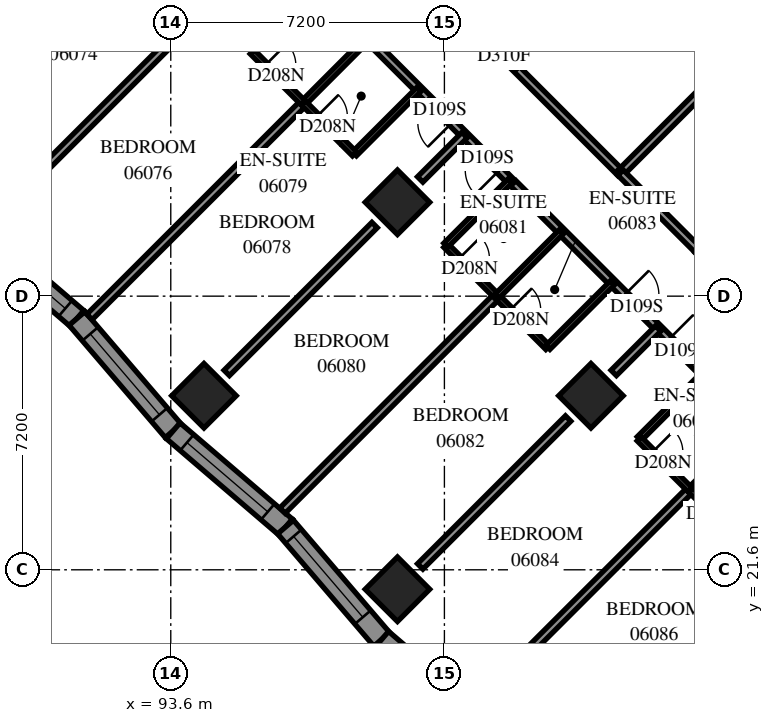
"""IFC4 building model, lengths in metres.
Left out: names, types, materials, properties, quantities, classifications, styles, units other than length and angle.
Written with IfcOpenShell. Run it as: python <this file> out.ifc"""

import sys

from ifc_helpers import new_model, si_unit, direction, frame, frame_2d, origin, origin_2d, place, context, subcontext, project, spatial, polyline, rectangle, outline, extrude, element, fill, save


model = new_model("IFC4")
c1 = context("Model", 3, precision=1e-05, world=origin(), true_north=direction((0.0, 1.0)))
c2 = subcontext(c1, "Body", "Model", "MODEL_VIEW")
j1 = project(units=[si_unit("LENGTHUNIT", "METRE"), si_unit("PLANEANGLEUNIT", "RADIAN")], contexts=[c1])
p1 = place(None, origin())
s1 = spatial("IfcSite", under=j1, at=p1, CompositionType="ELEMENT")
p2 = place(p1, origin())
s2 = spatial("IfcBuilding", under=s1, at=p2, CompositionType="ELEMENT")
p3 = place(p2, frame((0.0, 0.0, 27.0)))
s3 = spatial("IfcBuildingStorey", under=s2, at=p3, CompositionType="ELEMENT", Elevation=27.0)
for number, where, z_axis, x_axis in (
    (1, (99.565, 31.271, 0.0), (0.0, 0.0, 1.0), (0.707, -0.707, 0.0)),
    (2, (94.474, 26.18, 0.0), (0.0, 0.0, 1.0), (0.707, -0.707, 0.0)),
    (3, (104.656, 26.18, 0.0), (0.0, 0.0, 1.0), (0.707, -0.707, 0.0)),
    (4, (99.565, 21.088, 0.0), (0.0, 0.0, 1.0), (0.707, -0.707, 0.0)),
):
    element("IfcColumn", number, at=place(p3, frame(where, z_axis=z_axis, x_axis=x_axis)), inside=s3, PredefinedType="COLUMN", context=c2, shape_type="SweptSolid", body=[
        extrude(rectangle(XDim=1.2, YDim=1.2, at=origin_2d()), origin(), (0.0, 0.0, 1.0), 3.1),
    ])
p4 = place(p3, frame((88.177, 30.745, 0.0), z_axis=(0.0, 0.0, 1.0), x_axis=(0.7595159183, -0.6504887161, 0.0)))
e5 = element("IfcWall", 5, at=p4, inside=s3, PredefinedType="SOLIDWALL", context=c2, shape_type="SweptSolid", body=[
    extrude(outline(polyline([(-0.021, -0.275), (3.87, -0.275), (3.913, 0.275), (0.021, 0.275), (-0.021, -0.275)])), origin(), (0.0, 0.0, 1.0), 3.1),
])
p5 = place(p4, frame((0.687, 0.0, 0.5)))
e6 = element("IfcOpeningElement", 6, at=p5, cuts=e5, PredefinedType="OPENING", context=c2, shape_type="SweptSolid", body=[
    extrude(rectangle(XDim=2.8, YDim=2.45, at=frame_2d((1.4, 1.225))), frame((0.0, 0.285, 0.0), z_axis=(0.0, -1.0, 0.0), x_axis=(1.0, 0.0, 0.0)), (0.0, 0.0, 1.0), 0.57),
])
p6 = place(p3, frame((91.133, 28.213, 0.0), z_axis=(0.0, 0.0, 1.0), x_axis=(0.6504887161, -0.7595159183, 0.0)))
e7 = element("IfcWall", 7, at=p6, inside=s3, PredefinedType="SOLIDWALL", context=c2, shape_type="SweptSolid", body=[
    extrude(outline(polyline([(0.021, -0.275), (3.913, -0.275), (3.87, 0.275), (-0.021, 0.275), (0.021, -0.275)])), origin(), (0.0, 0.0, 1.0), 3.1),
])
p7 = place(p6, frame((0.535, 0.0, 0.5)))
e8 = element("IfcOpeningElement", 8, at=p7, cuts=e7, PredefinedType="OPENING", context=c2, shape_type="SweptSolid", body=[
    extrude(rectangle(XDim=2.8, YDim=2.45, at=frame_2d((1.4, 1.225))), frame((0.0, 0.285, 0.0), z_axis=(0.0, -1.0, 0.0), x_axis=(1.0, 0.0, 0.0)), (0.0, 0.0, 1.0), 0.57),
])
p8 = place(p3, frame((93.664, 25.258, 0.0), z_axis=(0.0, 0.0, 1.0), x_axis=(0.7595050452, -0.6505014115, 0.0)))
e9 = element("IfcWall", 9, at=p8, inside=s3, PredefinedType="SOLIDWALL", context=c2, shape_type="SweptSolid", body=[
    extrude(outline(polyline([(-0.021, -0.275), (3.87, -0.275), (3.913, 0.275), (0.021, 0.275), (-0.021, -0.275)])), origin(), (0.0, 0.0, 1.0), 3.1),
])
p9 = place(p8, frame((0.476, 0.0, 0.5)))
e10 = element("IfcOpeningElement", 10, at=p9, cuts=e9, PredefinedType="OPENING", context=c2, shape_type="SweptSolid", body=[
    extrude(rectangle(XDim=2.8, YDim=2.45, at=frame_2d((1.4, 1.225))), frame((0.0, 0.285, 0.0), z_axis=(0.0, -1.0, 0.0), x_axis=(1.0, 0.0, 0.0)), (0.0, 0.0, 1.0), 0.57),
])
p10 = place(p3, frame((96.62, 22.726, 0.0), z_axis=(0.0, 0.0, 1.0), x_axis=(0.6505014115, -0.7595050452, 0.0)))
e11 = element("IfcWall", 11, at=p10, inside=s3, PredefinedType="SOLIDWALL", context=c2, shape_type="SweptSolid", body=[
    extrude(outline(polyline([(0.021, -0.275), (3.913, -0.275), (3.87, 0.275), (-0.021, 0.275), (0.021, -0.275)])), origin(), (0.0, 0.0, 1.0), 3.1),
])
p11 = place(p10, frame((0.325, 0.0, 0.5)))
e12 = element("IfcOpeningElement", 12, at=p11, cuts=e11, PredefinedType="OPENING", context=c2, shape_type="SweptSolid", body=[
    extrude(rectangle(XDim=2.8, YDim=2.45, at=frame_2d((1.4, 1.225))), frame((0.0, 0.285, 0.0), z_axis=(0.0, -1.0, 0.0), x_axis=(1.0, 0.0, 0.0)), (0.0, 0.0, 1.0), 0.57),
])
p12 = place(p3, frame((99.151, 19.77, 0.0), z_axis=(0.0, 0.0, 1.0), x_axis=(0.7595163258, -0.6504882403, 0.0)))
e13 = element("IfcWall", 13, at=p12, inside=s3, PredefinedType="SOLIDWALL", context=c2, shape_type="SweptSolid", body=[
    extrude(outline(polyline([(-0.021, -0.275), (3.87, -0.275), (3.955, 0.275), (0.021, 0.275), (-0.021, -0.275)])), origin(), (0.0, 0.0, 1.0), 3.1),
])
p13 = place(p12, frame((0.995, 0.0, 0.5)))
e14 = element("IfcOpeningElement", 14, at=p13, cuts=e13, PredefinedType="OPENING", context=c2, shape_type="SweptSolid", body=[
    extrude(rectangle(XDim=1.2, YDim=2.45, at=frame_2d((0.6, 1.225))), frame((0.0, 0.285, 0.0), z_axis=(0.0, -1.0, 0.0), x_axis=(1.0, 0.0, 0.0)), (0.0, 0.0, 1.0), 0.57),
])
p14 = place(p3, frame((94.895, 42.581, 0.0), z_axis=(0.0, 0.0, 1.0), x_axis=(0.7071067812, -0.7071067812, 0.0)))
e15 = element("IfcWall", 15, at=p14, inside=s3, PredefinedType="PARTITIONING", context=c2, shape_type="SweptSolid", body=[
    extrude(rectangle(XDim=14.9, YDim=0.2, at=frame_2d((7.45, 0.0))), origin(), (0.0, 0.0, 1.0), 3.1),
])
p15 = place(p14, frame((2.8, 0.0, 0.0)))
e16 = element("IfcOpeningElement", 16, at=p15, cuts=e15, PredefinedType="OPENING", context=c2, shape_type="SweptSolid", body=[
    extrude(rectangle(XDim=0.9, YDim=2.1, at=frame_2d((0.45, 1.05))), frame((0.0, 0.11, 0.0), z_axis=(0.0, -1.0, 0.0), x_axis=(1.0, 0.0, 0.0)), (0.0, 0.0, 1.0), 0.22),
])
p16 = place(p14, frame((4.348, 0.0, 0.0)))
e17 = element("IfcOpeningElement", 17, at=p16, cuts=e15, PredefinedType="OPENING", context=c2, shape_type="SweptSolid", body=[
    extrude(rectangle(XDim=0.9, YDim=2.1, at=frame_2d((0.45, 1.05))), frame((0.0, 0.11, 0.0), z_axis=(0.0, -1.0, 0.0), x_axis=(1.0, 0.0, 0.0)), (0.0, 0.0, 1.0), 0.22),
])
p17 = place(p14, frame((10.073, 0.0, 0.0)))
e18 = element("IfcOpeningElement", 18, at=p17, cuts=e15, PredefinedType="OPENING", context=c2, shape_type="SweptSolid", body=[
    extrude(rectangle(XDim=1.0, YDim=2.1, at=frame_2d((0.5, 1.05))), frame((0.0, 0.11, 0.0), z_axis=(0.0, -1.0, 0.0), x_axis=(1.0, 0.0, 0.0)), (0.0, 0.0, 1.0), 0.22),
])
p18 = place(p3, frame((102.609, 31.769, 0.0), z_axis=(0.0, 0.0, 1.0), x_axis=(0.7071067812, -0.7071067812, 0.0)))
e19 = element("IfcWall", 19, at=p18, inside=s3, PredefinedType="PARTITIONING", context=c2, shape_type="SweptSolid", body=[
    extrude(rectangle(XDim=10.723, YDim=0.2, at=frame_2d((5.361, 0.0))), origin(), (0.0, 0.0, 1.0), 3.1),
])
p19 = place(p18, frame((4.15, 0.0, 0.0)))
e20 = element("IfcOpeningElement", 20, at=p19, cuts=e19, PredefinedType="OPENING", context=c2, shape_type="SweptSolid", body=[
    extrude(rectangle(XDim=0.9, YDim=2.1, at=frame_2d((0.45, 1.05))), frame((0.0, 0.11, 0.0), z_axis=(0.0, -1.0, 0.0), x_axis=(1.0, 0.0, 0.0)), (0.0, 0.0, 1.0), 0.22),
])
p20 = place(p18, frame((5.8, 0.0, 0.0)))
e21 = element("IfcOpeningElement", 21, at=p20, cuts=e19, PredefinedType="OPENING", context=c2, shape_type="SweptSolid", body=[
    extrude(rectangle(XDim=0.9, YDim=2.1, at=frame_2d((0.45, 1.05))), frame((0.0, 0.11, 0.0), z_axis=(0.0, -1.0, 0.0), x_axis=(1.0, 0.0, 0.0)), (0.0, 0.0, 1.0), 0.22),
])
p21 = place(p3, frame((105.437, 32.045, 0.0), z_axis=(0.0, 0.0, 1.0), x_axis=(0.7070125995, 0.7072009503, 0.0)))
e22 = element("IfcWall", 22, at=p21, inside=s3, PredefinedType="PARTITIONING", context=c2, shape_type="SweptSolid", body=[
    extrude(rectangle(XDim=10.618, YDim=0.2, at=frame_2d((5.309, 0.0))), origin(), (0.0, 0.0, 1.0), 3.1),
])
p22 = place(p3, frame((86.838, 34.522, 0.0), z_axis=(0.0, 0.0, 1.0), x_axis=(0.7072154749, 0.7069980708, 0.0)))
e23 = element("IfcWall", 23, at=p22, inside=s3, PredefinedType="PARTITIONING", context=c2, shape_type="SweptSolid", body=[
    extrude(rectangle(XDim=9.2, YDim=0.2, at=frame_2d((4.6, 0.0))), origin(), (0.0, 0.0, 1.0), 3.1),
])
p23 = place(p3, frame((101.597, 18.038, 0.0), z_axis=(0.0, 0.0, 1.0), x_axis=(0.7072439346, 0.7069696012, 0.0)))
e24 = element("IfcWall", 24, at=p23, inside=s3, PredefinedType="PARTITIONING", context=c2, shape_type="SweptSolid", body=[
    extrude(rectangle(XDim=8.019, YDim=0.2, at=frame_2d((4.01, 0.0))), origin(), (0.0, 0.0, 1.0), 3.1),
])
p24 = place(p3, frame((86.339, 33.313, 0.0), z_axis=(0.0, 0.0, 1.0), x_axis=(0.7069756325, 0.7072379055, 0.0)))
e25 = element("IfcWall", 25, at=p24, inside=s3, PredefinedType="PARTITIONING", context=c2, shape_type="SweptSolid", body=[
    extrude(rectangle(XDim=8.007, YDim=0.2, at=frame_2d((4.003, 0.0))), origin(), (0.0, 0.0, 1.0), 3.1),
])
p25 = place(p3, frame((96.54, 23.157, 0.0), z_axis=(0.0, 0.0, 1.0), x_axis=(0.7071067812, 0.7071067812, 0.0)))
e26 = element("IfcWall", 26, at=p25, inside=s3, PredefinedType="PARTITIONING", context=c2, shape_type="SweptSolid", body=[
    extrude(rectangle(XDim=7.977, YDim=0.2, at=frame_2d((3.989, 0.0))), origin(), (0.0, 0.0, 1.0), 3.1),
])
p26 = place(p3, frame((91.461, 28.253, 0.0), z_axis=(0.0, 0.0, 1.0), x_axis=(0.707238618, 0.7069749198, 0.0)))
e27 = element("IfcWall", 27, at=p26, inside=s3, PredefinedType="PARTITIONING", context=c2, shape_type="SweptSolid", body=[
    extrude(rectangle(XDim=7.964, YDim=0.2, at=frame_2d((3.982, 0.0))), origin(), (0.0, 0.0, 1.0), 3.1),
])
p27 = place(p3, frame((102.531, 31.833, 0.0), z_axis=(0.0, 0.0, 1.0), x_axis=(-0.7070095491, 0.7072039999, 0.0)))
e28 = element("IfcWall", 28, at=p27, inside=s3, PredefinedType="PARTITIONING", context=c2, shape_type="SweptSolid", body=[
    extrude(rectangle(XDim=7.2, YDim=0.2, at=frame_2d((3.6, 0.0))), origin(), (0.0, 0.0, 1.0), 3.1),
])
p28 = place(p27, frame((2.165, 0.0, 0.0)))
e29 = element("IfcOpeningElement", 29, at=p28, cuts=e28, PredefinedType="OPENING", context=c2, shape_type="SweptSolid", body=[
    extrude(rectangle(XDim=0.9, YDim=2.1, at=frame_2d((0.45, 1.05))), frame((0.0, 0.11, 0.0), z_axis=(0.0, -1.0, 0.0), x_axis=(1.0, 0.0, 0.0)), (0.0, 0.0, 1.0), 0.22),
])
p29 = place(p27, frame((0.4, 0.0, 0.0)))
e30 = element("IfcOpeningElement", 30, at=p29, cuts=e28, PredefinedType="OPENING", context=c2, shape_type="SweptSolid", body=[
    extrude(rectangle(XDim=0.9, YDim=2.1, at=frame_2d((0.45, 1.05))), frame((0.0, 0.11, 0.0), z_axis=(0.0, -1.0, 0.0), x_axis=(1.0, 0.0, 0.0)), (0.0, 0.0, 1.0), 0.22),
])
p30 = place(p3, frame((105.255, 16.599, 0.0), z_axis=(0.0, 0.0, 1.0), x_axis=(0.7071067812, 0.7071067812, 0.0)))
e31 = element("IfcWall", 31, at=p30, inside=s3, PredefinedType="PARTITIONING", context=c2, shape_type="SweptSolid", body=[
    extrude(rectangle(XDim=5.504, YDim=0.2, at=frame_2d((2.752, 0.0))), origin(), (0.0, 0.0, 1.0), 2.6),
])
for number, where, z_axis, x_axis in (
    (32, (89.981, 31.871, 0.0), (0.0, 0.0, 1.0), (0.707, 0.707, 0.0)),
    (33, (100.163, 21.689, 0.0), (0.0, 0.0, 1.0), (0.707, 0.707, 0.0)),
):
    element("IfcWall", number, at=place(p3, frame(where, z_axis=z_axis, x_axis=x_axis)), inside=s3, PredefinedType="PARTITIONING", context=c2, shape_type="SweptSolid", body=[
        extrude(rectangle(XDim=5.504, YDim=0.2, at=frame_2d((2.752, 0.0))), origin(), (0.0, 0.0, 1.0), 3.1),
    ])
p31 = place(p3, frame((95.073, 26.781, 0.0), z_axis=(0.0, 0.0, 1.0), x_axis=(0.7071067812, 0.7071067812, 0.0)))
e34 = element("IfcWall", 34, at=p31, inside=s3, PredefinedType="PARTITIONING", context=c2, shape_type="SweptSolid", body=[
    extrude(rectangle(XDim=5.501, YDim=0.2, at=frame_2d((2.751, 0.0))), origin(), (0.0, 0.0, 1.0), 3.1),
])
p32 = place(p3, frame((100.836, 30.138, 0.0), z_axis=(0.0, 0.0, 1.0), x_axis=(0.7065802685, -0.7076329021, 0.0)))
e35 = element("IfcWall", 35, at=p32, inside=s3, PredefinedType="PARTITIONING", context=c2, shape_type="SweptSolid", body=[
    extrude(rectangle(XDim=3.8, YDim=0.15, at=frame_2d((1.9, 0.0))), origin(), (0.0, 0.0, 1.0), 3.1),
])
p33 = place(p32, frame((0.493, 0.0, 0.0)))
e36 = element("IfcOpeningElement", 36, at=p33, cuts=e35, PredefinedType="OPENING", context=c2, shape_type="SweptSolid", body=[
    extrude(rectangle(XDim=0.8, YDim=2.1, at=frame_2d((0.4, 1.05))), frame((0.0, 0.085, 0.0), z_axis=(0.0, -1.0, 0.0), x_axis=(1.0, 0.0, 0.0)), (0.0, 0.0, 1.0), 0.17),
])
p34 = place(p32, frame((2.402, 0.0, 0.0)))
e37 = element("IfcOpeningElement", 37, at=p34, cuts=e35, PredefinedType="OPENING", context=c2, shape_type="SweptSolid", body=[
    extrude(rectangle(XDim=0.8, YDim=2.1, at=frame_2d((0.4, 1.05))), frame((0.0, 0.085, 0.0), z_axis=(0.0, -1.0, 0.0), x_axis=(1.0, 0.0, 0.0)), (0.0, 0.0, 1.0), 0.17),
])
p35 = place(p3, frame((105.435, 32.049, 0.0), z_axis=(0.0, 0.0, 1.0), x_axis=(0.7074545101, -0.7067588812, 0.0)))
e38 = element("IfcWall", 38, at=p35, inside=s3, PredefinedType="PARTITIONING", context=c2, shape_type="SweptSolid", body=[
    extrude(rectangle(XDim=2.875, YDim=0.2, at=frame_2d((1.438, 0.0))), origin(), (0.0, 0.0, 1.0), 3.1),
])
for number, where, z_axis, x_axis in (
    (39, (95.745, 35.231, 0.0), (0.0, 0.0, 1.0), (0.707, 0.707, 0.0)),
    (40, (103.523, 27.453, 0.0), (0.0, 0.0, 1.0), (0.707, 0.707, 0.0)),
    (41, (105.927, 25.049, 0.0), (0.0, 0.0, 1.0), (0.707, 0.707, 0.0)),
    (42, (107.271, 23.705, 0.0), (0.0, 0.0, 1.0), (0.707, 0.707, 0.0)),
):
    element("IfcWall", number, at=place(p3, frame(where, z_axis=z_axis, x_axis=x_axis)), inside=s3, PredefinedType="PARTITIONING", context=c2, shape_type="SweptSolid", body=[
        extrude(rectangle(XDim=2.401, YDim=0.15, at=frame_2d((1.201, 0.0))), origin(), (0.0, 0.0, 1.0), 3.1),
    ])
p36 = place(p3, frame((97.092, 33.884, 0.0), z_axis=(0.0, 0.0, 1.0), x_axis=(0.706689978, 0.7075233388, 0.0)))
e43 = element("IfcWall", 43, at=p36, inside=s3, PredefinedType="PARTITIONING", context=c2, shape_type="SweptSolid", body=[
    extrude(rectangle(XDim=2.4, YDim=0.15, at=frame_2d((1.2, 0.0))), origin(), (0.0, 0.0, 1.0), 3.1),
])
for number, where, z_axis, x_axis in (
    (44, (100.837, 30.141, 0.0), (0.0, 0.0, 1.0), (0.707, 0.707, 0.0)),
    (45, (98.433, 32.545, 0.0), (0.0, 0.0, 1.0), (0.707, 0.707, 0.0)),
    (46, (102.181, 28.797, 0.0), (0.0, 0.0, 1.0), (0.707, 0.707, 0.0)),
):
    element("IfcWall", number, at=place(p3, frame(where, z_axis=z_axis, x_axis=x_axis)), inside=s3, PredefinedType="PARTITIONING", context=c2, shape_type="SweptSolid", body=[
        extrude(rectangle(XDim=2.398, YDim=0.15, at=frame_2d((1.199, 0.0))), origin(), (0.0, 0.0, 1.0), 3.1),
    ])
p37 = place(p3, frame((105.925, 25.045, 0.0), z_axis=(0.0, 0.0, 1.0), x_axis=(0.7071067812, -0.7071067812, 0.0)))
e47 = element("IfcWall", 47, at=p37, inside=s3, PredefinedType="PARTITIONING", context=c2, shape_type="SweptSolid", body=[
    extrude(rectangle(XDim=1.901, YDim=0.15, at=frame_2d((0.95, 0.0))), origin(), (0.0, 0.0, 1.0), 3.1),
])
p38 = place(p37, frame((0.493, 0.0, 0.0)))
e48 = element("IfcOpeningElement", 48, at=p38, cuts=e47, PredefinedType="OPENING", context=c2, shape_type="SweptSolid", body=[
    extrude(rectangle(XDim=0.8, YDim=2.1, at=frame_2d((0.4, 1.05))), frame((0.0, 0.085, 0.0), z_axis=(0.0, -1.0, 0.0), x_axis=(1.0, 0.0, 0.0)), (0.0, 0.0, 1.0), 0.17),
])
p39 = place(p3, frame((95.743, 35.227, 0.0), z_axis=(0.0, 0.0, 1.0), x_axis=(0.7071067812, -0.7071067812, 0.0)))
e49 = element("IfcWall", 49, at=p39, inside=s3, PredefinedType="PARTITIONING", context=c2, shape_type="SweptSolid", body=[
    extrude(rectangle(XDim=1.901, YDim=0.15, at=frame_2d((0.95, 0.0))), origin(), (0.0, 0.0, 1.0), 3.1),
])
p40 = place(p39, frame((0.491, 0.0, 0.0)))
e50 = element("IfcOpeningElement", 50, at=p40, cuts=e49, PredefinedType="OPENING", context=c2, shape_type="SweptSolid", body=[
    extrude(rectangle(XDim=0.8, YDim=2.1, at=frame_2d((0.4, 1.05))), frame((0.0, 0.085, 0.0), z_axis=(0.0, -1.0, 0.0), x_axis=(1.0, 0.0, 0.0)), (0.0, 0.0, 1.0), 0.17),
])
p41 = place(p3, frame((107.272, 23.704, 0.0), z_axis=(0.0, 0.0, 1.0), x_axis=(0.7076330979, -0.7065800724, 0.0)))
e51 = element("IfcWall", 51, at=p41, inside=s3, PredefinedType="PARTITIONING", context=c2, shape_type="SweptSolid", body=[
    extrude(rectangle(XDim=1.899, YDim=0.15, at=frame_2d((0.95, 0.0))), origin(), (0.0, 0.0, 1.0), 3.1),
])
p42 = place(p41, frame((0.503, 0.0, 0.0)))
e52 = element("IfcOpeningElement", 52, at=p42, cuts=e51, PredefinedType="OPENING", context=c2, shape_type="SweptSolid", body=[
    extrude(rectangle(XDim=0.8, YDim=2.1, at=frame_2d((0.4, 1.05))), frame((0.0, 0.085, 0.0), z_axis=(0.0, -1.0, 0.0), x_axis=(1.0, 0.0, 0.0)), (0.0, 0.0, 1.0), 0.17),
])
p43 = place(p3, frame((97.09, 33.886, 0.0), z_axis=(0.0, 0.0, 1.0), x_axis=(0.7076330979, -0.7065800724, 0.0)))
e53 = element("IfcWall", 53, at=p43, inside=s3, PredefinedType="PARTITIONING", context=c2, shape_type="SweptSolid", body=[
    extrude(rectangle(XDim=1.899, YDim=0.15, at=frame_2d((0.95, 0.0))), origin(), (0.0, 0.0, 1.0), 3.1),
])
p44 = place(p43, frame((0.504, 0.0, 0.0)))
e54 = element("IfcOpeningElement", 54, at=p44, cuts=e53, PredefinedType="OPENING", context=c2, shape_type="SweptSolid", body=[
    extrude(rectangle(XDim=0.8, YDim=2.1, at=frame_2d((0.4, 1.05))), frame((0.0, 0.085, 0.0), z_axis=(0.0, -1.0, 0.0), x_axis=(1.0, 0.0, 0.0)), (0.0, 0.0, 1.0), 0.17),
])
for number, where, z_axis, x_axis in (
    (55, (105.255, 26.781, 0.0), (0.0, 0.0, 1.0), (0.707, 0.707, 0.0)),
    (56, (100.163, 31.871, 0.0), (0.0, 0.0, 1.0), (0.707, 0.707, 0.0)),
):
    element("IfcWall", number, at=place(p3, frame(where, z_axis=z_axis, x_axis=x_axis)), inside=s3, PredefinedType="PARTITIONING", context=c2, shape_type="SweptSolid", body=[
        extrude(rectangle(XDim=1.652, YDim=0.2, at=frame_2d((0.826, 0.0))), origin(), (0.0, 0.0, 1.0), 3.1),
    ])
p45 = place(p5, origin())
e57 = element("IfcWindow", 57, at=p45, inside=s3, PartitioningType="SINGLE_PANEL", PredefinedType="WINDOW", context=c2, shape_type="SweptSolid", body=[
    extrude(rectangle(XDim=2.8, YDim=2.45, at=frame_2d((1.4, 1.225))), frame((0.0, 0.155, 0.0), z_axis=(0.0, -1.0, 0.0), x_axis=(1.0, 0.0, 0.0)), (0.0, 0.0, 1.0), 0.06),
])
fill(e6, e57)
p46 = place(p7, origin())
e58 = element("IfcWindow", 58, at=p46, inside=s3, PartitioningType="SINGLE_PANEL", PredefinedType="WINDOW", context=c2, shape_type="SweptSolid", body=[
    extrude(rectangle(XDim=2.8, YDim=2.45, at=frame_2d((1.4, 1.225))), frame((0.0, 0.155, 0.0), z_axis=(0.0, -1.0, 0.0), x_axis=(1.0, 0.0, 0.0)), (0.0, 0.0, 1.0), 0.06),
])
fill(e8, e58)
p47 = place(p9, origin())
e59 = element("IfcWindow", 59, at=p47, inside=s3, PartitioningType="SINGLE_PANEL", PredefinedType="WINDOW", context=c2, shape_type="SweptSolid", body=[
    extrude(rectangle(XDim=2.8, YDim=2.45, at=frame_2d((1.4, 1.225))), frame((0.0, 0.155, 0.0), z_axis=(0.0, -1.0, 0.0), x_axis=(1.0, 0.0, 0.0)), (0.0, 0.0, 1.0), 0.06),
])
fill(e10, e59)
p48 = place(p11, origin())
e60 = element("IfcWindow", 60, at=p48, inside=s3, PartitioningType="SINGLE_PANEL", PredefinedType="WINDOW", context=c2, shape_type="SweptSolid", body=[
    extrude(rectangle(XDim=2.8, YDim=2.45, at=frame_2d((1.4, 1.225))), frame((0.0, 0.155, 0.0), z_axis=(0.0, -1.0, 0.0), x_axis=(1.0, 0.0, 0.0)), (0.0, 0.0, 1.0), 0.06),
])
fill(e12, e60)
p49 = place(p17, origin())
e61 = element("IfcDoor", 61, at=p49, inside=s3, OperationType="SINGLE_SWING_RIGHT", PredefinedType="DOOR", context=c2, shape_type="SweptSolid", body=[
    extrude(rectangle(XDim=1.0, YDim=2.1, at=frame_2d((0.5, 1.05))), frame((0.0, 0.025, 0.0), z_axis=(0.0, -1.0, 0.0), x_axis=(1.0, 0.0, 0.0)), (0.0, 0.0, 1.0), 0.05),
])
fill(e18, e61)
p50 = place(p40, origin())
e62 = element("IfcDoor", 62, at=p50, inside=s3, OperationType="SINGLE_SWING_RIGHT", PredefinedType="DOOR", context=c2, shape_type="SweptSolid", body=[
    extrude(rectangle(XDim=0.8, YDim=2.1, at=frame_2d((0.4, 1.05))), frame((0.0, 0.025, 0.0), z_axis=(0.0, -1.0, 0.0), x_axis=(1.0, 0.0, 0.0)), (0.0, 0.0, 1.0), 0.05),
])
fill(e50, e62)
p51 = place(p28, origin())
e63 = element("IfcDoor", 63, at=p51, inside=s3, OperationType="SINGLE_SWING_LEFT", PredefinedType="DOOR", context=c2, shape_type="SweptSolid", body=[
    extrude(rectangle(XDim=0.9, YDim=2.1, at=frame_2d((0.45, 1.05))), frame((0.0, 0.025, 0.0), z_axis=(0.0, -1.0, 0.0), x_axis=(1.0, 0.0, 0.0)), (0.0, 0.0, 1.0), 0.05),
])
fill(e29, e63)
p52 = place(p44, origin())
e64 = element("IfcDoor", 64, at=p52, inside=s3, OperationType="SINGLE_SWING_RIGHT", PredefinedType="DOOR", context=c2, shape_type="SweptSolid", body=[
    extrude(rectangle(XDim=0.8, YDim=2.1, at=frame_2d((0.4, 1.05))), frame((0.0, 0.025, 0.0), z_axis=(0.0, -1.0, 0.0), x_axis=(1.0, 0.0, 0.0)), (0.0, 0.0, 1.0), 0.05),
])
fill(e54, e64)
p53 = place(p29, origin())
e65 = element("IfcDoor", 65, at=p53, inside=s3, OperationType="SINGLE_SWING_RIGHT", PredefinedType="DOOR", context=c2, shape_type="SweptSolid", body=[
    extrude(rectangle(XDim=0.9, YDim=2.1, at=frame_2d((0.45, 1.05))), frame((0.0, 0.025, 0.0), z_axis=(0.0, -1.0, 0.0), x_axis=(1.0, 0.0, 0.0)), (0.0, 0.0, 1.0), 0.05),
])
fill(e30, e65)
p54 = place(p33, origin())
e66 = element("IfcDoor", 66, at=p54, inside=s3, OperationType="SINGLE_SWING_RIGHT", PredefinedType="DOOR", context=c2, shape_type="SweptSolid", body=[
    extrude(rectangle(XDim=0.8, YDim=2.1, at=frame_2d((0.4, 1.05))), frame((0.0, 0.025, 0.0), z_axis=(0.0, -1.0, 0.0), x_axis=(1.0, 0.0, 0.0)), (0.0, 0.0, 1.0), 0.05),
])
fill(e36, e66)
p55 = place(p19, origin())
e67 = element("IfcDoor", 67, at=p55, inside=s3, OperationType="SINGLE_SWING_LEFT", PredefinedType="DOOR", context=c2, shape_type="SweptSolid", body=[
    extrude(rectangle(XDim=0.9, YDim=2.1, at=frame_2d((0.45, 1.05))), frame((0.0, 0.025, 0.0), z_axis=(0.0, -1.0, 0.0), x_axis=(1.0, 0.0, 0.0)), (0.0, 0.0, 1.0), 0.05),
])
fill(e20, e67)
p56 = place(p34, origin())
e68 = element("IfcDoor", 68, at=p56, inside=s3, OperationType="SINGLE_SWING_RIGHT", PredefinedType="DOOR", context=c2, shape_type="SweptSolid", body=[
    extrude(rectangle(XDim=0.8, YDim=2.1, at=frame_2d((0.4, 1.05))), frame((0.0, 0.025, 0.0), z_axis=(0.0, -1.0, 0.0), x_axis=(1.0, 0.0, 0.0)), (0.0, 0.0, 1.0), 0.05),
])
fill(e37, e68)
p57 = place(p20, origin())
e69 = element("IfcDoor", 69, at=p57, inside=s3, OperationType="SINGLE_SWING_RIGHT", PredefinedType="DOOR", context=c2, shape_type="SweptSolid", body=[
    extrude(rectangle(XDim=0.9, YDim=2.1, at=frame_2d((0.45, 1.05))), frame((0.0, 0.025, 0.0), z_axis=(0.0, -1.0, 0.0), x_axis=(1.0, 0.0, 0.0)), (0.0, 0.0, 1.0), 0.05),
])
fill(e21, e69)
p58 = place(p38, origin())
e70 = element("IfcDoor", 70, at=p58, inside=s3, OperationType="SINGLE_SWING_RIGHT", PredefinedType="DOOR", context=c2, shape_type="SweptSolid", body=[
    extrude(rectangle(XDim=0.8, YDim=2.1, at=frame_2d((0.4, 1.05))), frame((0.0, 0.025, 0.0), z_axis=(0.0, -1.0, 0.0), x_axis=(1.0, 0.0, 0.0)), (0.0, 0.0, 1.0), 0.05),
])
fill(e48, e70)
save(model, sys.argv[1])
